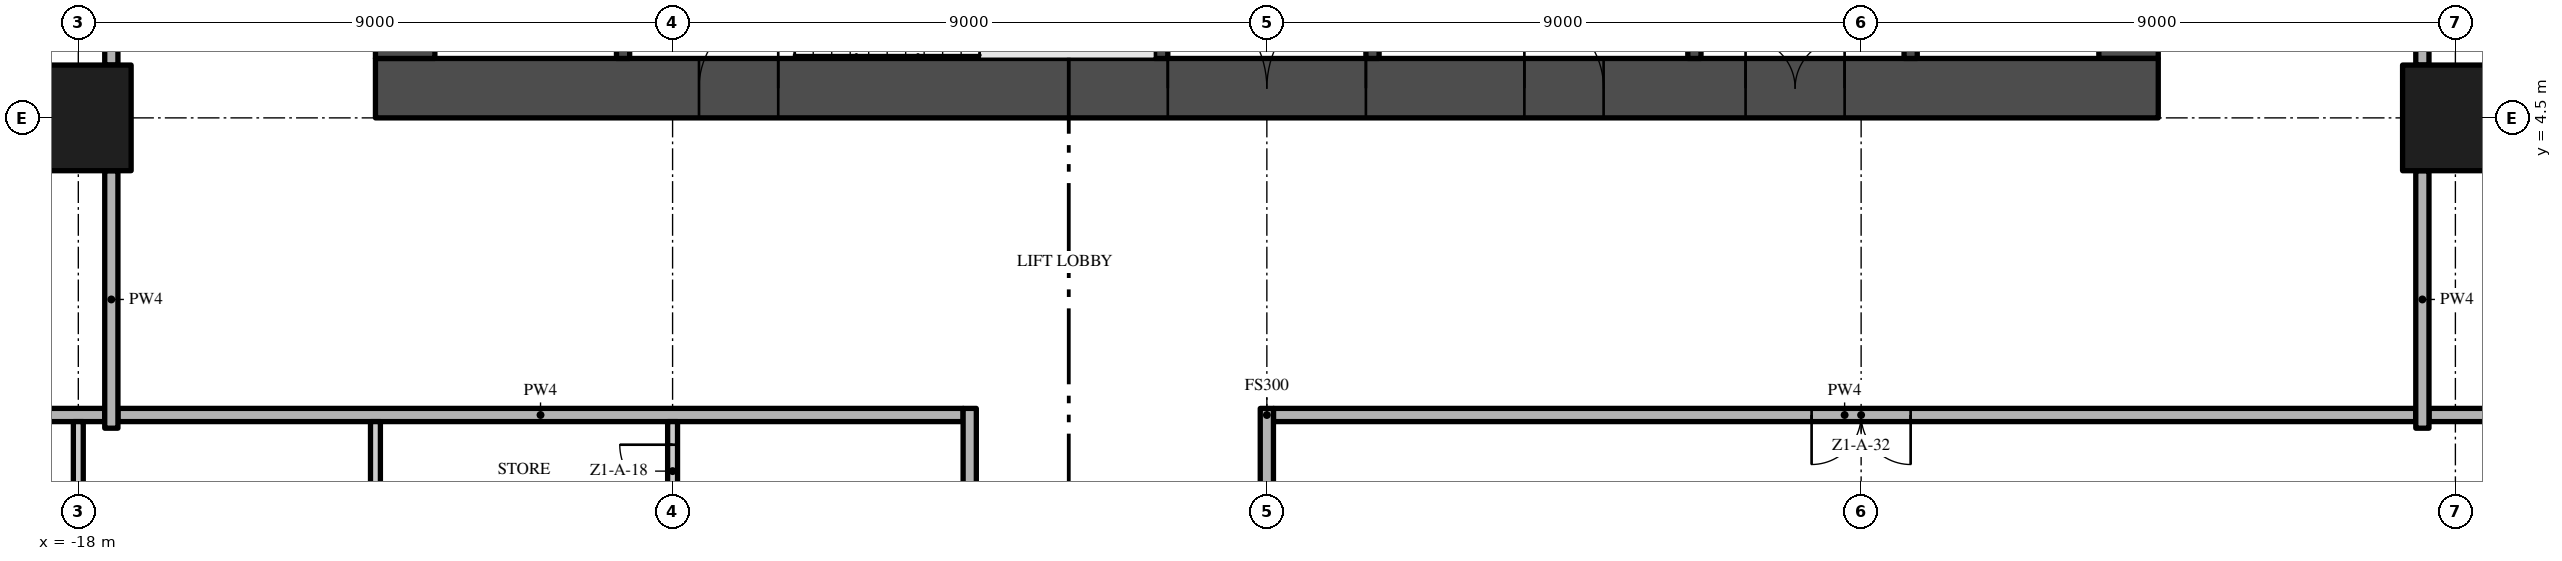
"""IFC4 building model, lengths in metres.
Left out: names, types, materials, properties, quantities, classifications, styles, units other than length and angle.
Written with IfcOpenShell. Run it as: python <this file> out.ifc"""

import sys

from ifc_helpers import new_model, si_unit, direction, frame, frame_2d, origin, origin_2d, place, context, subcontext, project, spatial, rectangle, extrude, element, fill, save


model = new_model("IFC4")
c1 = context("Model", 3, precision=1e-05, world=origin(), true_north=direction((0.0, 1.0)))
c2 = subcontext(c1, "Body", "Model", "MODEL_VIEW")
j1 = project(units=[si_unit("LENGTHUNIT", "METRE"), si_unit("PLANEANGLEUNIT", "RADIAN")], contexts=[c1])
p1 = place(None, origin())
s1 = spatial("IfcSite", under=j1, at=p1, CompositionType="ELEMENT")
p2 = place(p1, origin())
s2 = spatial("IfcBuilding", under=s1, at=p2, CompositionType="ELEMENT")
p3 = place(p2, frame((0.0, 0.0, 15.0)))
s3 = spatial("IfcBuildingStorey", under=s2, at=p3, CompositionType="ELEMENT", Elevation=15.0)
p4 = place(p3, frame((-13.5, 4.95, -0.3), z_axis=(0.0, 0.0, 1.0), x_axis=(1.0, 0.0, 0.0)))
e1 = element("IfcWall", 1, at=p4, inside=s3, PredefinedType="SHEAR", context=c2, shape_type="SweptSolid", body=[
    extrude(rectangle(XDim=27.0, YDim=0.9, at=frame_2d((13.5, 0.0))), origin(), (0.0, 0.0, 1.0), 3.8),
])
p5 = place(p4, frame((12.0, 0.0, 0.3)))
e2 = element("IfcOpeningElement", 2, at=p5, cuts=e1, PredefinedType="OPENING", context=c2, shape_type="SweptSolid", body=[
    extrude(rectangle(XDim=3.0, YDim=2.4, at=frame_2d((1.5, 1.2))), frame((0.0, 0.46, 0.0), z_axis=(0.0, -1.0, 0.0), x_axis=(1.0, 0.0, 0.0)), (0.0, 0.0, 1.0), 0.92),
])
p6 = place(p4, frame((4.9, 0.0, 0.3)))
e3 = element("IfcOpeningElement", 3, at=p6, cuts=e1, PredefinedType="OPENING", context=c2, shape_type="SweptSolid", body=[
    extrude(rectangle(XDim=1.2, YDim=2.2, at=frame_2d((0.6, 1.1))), frame((0.0, 0.46, 0.0), z_axis=(0.0, -1.0, 0.0), x_axis=(1.0, 0.0, 0.0)), (0.0, 0.0, 1.0), 0.92),
])
p7 = place(p4, frame((20.75, 0.0, 0.3)))
e4 = element("IfcOpeningElement", 4, at=p7, cuts=e1, PredefinedType="OPENING", context=c2, shape_type="SweptSolid", body=[
    extrude(rectangle(XDim=1.5, YDim=2.2, at=frame_2d((0.75, 1.1))), frame((0.0, 0.46, 0.0), z_axis=(0.0, -1.0, 0.0), x_axis=(1.0, 0.0, 0.0)), (0.0, 0.0, 1.0), 0.92),
])
p8 = place(p4, frame((17.4, 0.0, 0.3)))
e5 = element("IfcOpeningElement", 5, at=p8, cuts=e1, PredefinedType="OPENING", context=c2, shape_type="SweptSolid", body=[
    extrude(rectangle(XDim=1.2, YDim=2.2, at=frame_2d((0.6, 1.1))), frame((0.0, 0.46, 0.0), z_axis=(0.0, -1.0, 0.0), x_axis=(1.0, 0.0, 0.0)), (0.0, 0.0, 1.0), 0.92),
])
p9 = place(p3, frame((13.05, 5.4, -0.3), z_axis=(0.0, 0.0, 1.0), x_axis=(0.0, 1.0, 0.0)))
e6 = element("IfcWall", 6, at=p9, inside=s3, PredefinedType="SHEAR", context=c2, shape_type="SweptSolid", body=[
    extrude(rectangle(XDim=16.2, YDim=0.9, at=frame_2d((8.1, 0.0))), origin(), (0.0, 0.0, 1.0), 3.8),
])
p10 = place(p9, frame((6.0, 0.0, 0.3)))
e7 = element("IfcOpeningElement", 7, at=p10, cuts=e6, PredefinedType="OPENING", context=c2, shape_type="SweptSolid", body=[
    extrude(rectangle(XDim=1.2, YDim=2.2, at=frame_2d((0.6, 1.1))), frame((0.0, 0.46, 0.0), z_axis=(0.0, -1.0, 0.0), x_axis=(1.0, 0.0, 0.0)), (0.0, 0.0, 1.0), 0.92),
])
p11 = place(p3, frame((-13.05, 21.6, -0.3), z_axis=(0.0, 0.0, 1.0), x_axis=(0.0, -1.0, 0.0)))
e8 = element("IfcWall", 8, at=p11, inside=s3, PredefinedType="SHEAR", context=c2, shape_type="SweptSolid", body=[
    extrude(rectangle(XDim=16.2, YDim=0.9, at=frame_2d((8.1, 0.0))), origin(), (0.0, 0.0, 1.0), 3.8),
])
p12 = place(p11, frame((9.0, 0.0, 0.3)))
e9 = element("IfcOpeningElement", 9, at=p12, cuts=e8, PredefinedType="OPENING", context=c2, shape_type="SweptSolid", body=[
    extrude(rectangle(XDim=1.2, YDim=2.2, at=frame_2d((0.6, 1.1))), frame((0.0, 0.46, 0.0), z_axis=(0.0, -1.0, 0.0), x_axis=(1.0, 0.0, 0.0)), (0.0, 0.0, 1.0), 0.92),
])
for number, where, z_axis, x_axis in (
    (10, (-18.0, 4.5, 0.0), (0.0, 0.0, 1.0), (1.0, 0.0, 0.0)),
    (11, (18.0, 4.5, 0.0), (0.0, 0.0, 1.0), (1.0, 0.0, 0.0)),
):
    element("IfcColumn", number, at=place(p3, frame(where, z_axis=z_axis, x_axis=x_axis)), inside=s3, PredefinedType="COLUMN", context=c2, shape_type="SweptSolid", body=[
        extrude(rectangle(XDim=1.6, YDim=1.6, at=origin_2d()), origin(), (0.0, 0.0, 1.0), 3.5),
    ])
for number, where, z_axis, x_axis in (
    (12, (-9.75, 5.4, 0.0), (0.0, 0.0, 1.0), (0.0, 1.0, 0.0)),
    (13, (-1.6, 5.4, 0.0), (0.0, 0.0, 1.0), (0.0, 1.0, 0.0)),
):
    element("IfcWall", number, at=place(p3, frame(where, z_axis=z_axis, x_axis=x_axis)), inside=s3, PredefinedType="SHEAR", context=c2, shape_type="SweptSolid", body=[
        extrude(rectangle(XDim=2.55, YDim=0.2, at=frame_2d((1.275, 0.0))), origin(), (0.0, 0.0, 1.0), 3.5),
    ])
p13 = place(p3, frame((1.6, 11.5, 0.0), z_axis=(0.0, 0.0, 1.0), x_axis=(0.0, -1.0, 0.0)))
e14 = element("IfcWall", 14, at=p13, inside=s3, PredefinedType="SHEAR", context=c2, shape_type="SweptSolid", body=[
    extrude(rectangle(XDim=6.1, YDim=0.2, at=frame_2d((3.05, 0.0))), origin(), (0.0, 0.0, 1.0), 3.5),
])
p14 = place(p13, frame((2.2, 0.0, 0.0)))
e15 = element("IfcOpeningElement", 15, at=p14, cuts=e14, PredefinedType="OPENING", context=c2, shape_type="SweptSolid", body=[
    extrude(rectangle(XDim=0.9, YDim=2.1, at=frame_2d((0.45, 1.05))), frame((0.0, 0.11, 0.0), z_axis=(0.0, -1.0, 0.0), x_axis=(1.0, 0.0, 0.0)), (0.0, 0.0, 1.0), 0.22),
])
p15 = place(p3, frame((6.475, 5.4, 0.0), z_axis=(0.0, 0.0, 1.0), x_axis=(0.0, 1.0, 0.0)))
e16 = element("IfcWall", 16, at=p15, inside=s3, PredefinedType="SHEAR", context=c2, shape_type="SweptSolid", body=[
    extrude(rectangle(XDim=6.1, YDim=0.2, at=frame_2d((3.05, 0.0))), origin(), (0.0, 0.0, 1.0), 3.5),
])
p16 = place(p3, frame((9.75, 5.4, 0.0), z_axis=(0.0, 0.0, 1.0), x_axis=(0.0, 1.0, 0.0)))
e17 = element("IfcWall", 17, at=p16, inside=s3, PredefinedType="SHEAR", context=c2, shape_type="SweptSolid", body=[
    extrude(rectangle(XDim=2.2, YDim=0.2, at=frame_2d((1.1, 0.0))), origin(), (0.0, 0.0, 1.0), 3.5),
])
p17 = place(p16, frame((0.55, 0.0, 0.0)))
e18 = element("IfcOpeningElement", 18, at=p17, cuts=e17, PredefinedType="OPENING", context=c2, shape_type="SweptSolid", body=[
    extrude(rectangle(XDim=1.1, YDim=2.1, at=frame_2d((0.55, 1.05))), frame((0.0, 0.11, 0.0), z_axis=(0.0, -1.0, 0.0), x_axis=(1.0, 0.0, 0.0)), (0.0, 0.0, 1.0), 0.22),
])
p18 = place(p3, frame((-17.4, 0.0, 0.0), z_axis=(0.0, 0.0, 1.0), x_axis=(1.0, 0.0, 0.0)))
e19 = element("IfcWall", 19, at=p18, inside=s3, PredefinedType="PARTITIONING", context=c2, shape_type="SweptSolid", body=[
    extrude(rectangle(XDim=12.8, YDim=0.2, at=frame_2d((6.4, 0.0))), origin(), (0.0, 0.0, 1.0), 3.5),
])
p19 = place(p3, frame((17.4, 0.0, 0.0), z_axis=(0.0, 0.0, 1.0), x_axis=(-1.0, 0.0, 0.0)))
e20 = element("IfcWall", 20, at=p19, inside=s3, PredefinedType="PARTITIONING", context=c2, shape_type="SweptSolid", body=[
    extrude(rectangle(XDim=17.3, YDim=0.2, at=frame_2d((8.65, 0.0))), origin(), (0.0, 0.0, 1.0), 3.5),
])
p20 = place(p19, frame((7.65, 0.0, 0.0)))
e21 = element("IfcOpeningElement", 21, at=p20, cuts=e20, PredefinedType="OPENING", context=c2, shape_type="SweptSolid", body=[
    extrude(rectangle(XDim=1.5, YDim=2.4, at=frame_2d((0.75, 1.2))), frame((0.0, 0.11, 0.0), z_axis=(0.0, -1.0, 0.0), x_axis=(1.0, 0.0, 0.0)), (0.0, 0.0, 1.0), 0.22),
])
for number, where, z_axis, x_axis in (
    (22, (-26.7, 0.0, 0.0), (0.0, 0.0, 1.0), (1.0, 0.0, 0.0)),
    (23, (17.6, 0.0, 0.0), (0.0, 0.0, 1.0), (1.0, 0.0, 0.0)),
):
    element("IfcWall", number, at=place(p3, frame(where, z_axis=z_axis, x_axis=x_axis)), inside=s3, PredefinedType="PARTITIONING", context=c2, shape_type="SweptSolid", body=[
        extrude(rectangle(XDim=9.1, YDim=0.2, at=frame_2d((4.55, 0.0))), origin(), (0.0, 0.0, 1.0), 3.5),
    ])
p21 = place(p3, frame((-18.0, -3.7, 0.0), z_axis=(0.0, 0.0, 1.0), x_axis=(0.0, 1.0, 0.0)))
e24 = element("IfcWall", 24, at=p21, inside=s3, PredefinedType="PARTITIONING", context=c2, shape_type="SweptSolid", body=[
    extrude(rectangle(XDim=3.6, YDim=0.15, at=frame_2d((1.8, 0.0))), origin(), (0.0, 0.0, 1.0), 3.5),
])
p22 = place(p3, frame((-17.5, -0.2, 0.0), z_axis=(0.0, 0.0, 1.0), x_axis=(0.0, 1.0, 0.0)))
e25 = element("IfcWall", 25, at=p22, inside=s3, PredefinedType="PARTITIONING", context=c2, shape_type="SweptSolid", body=[
    extrude(rectangle(XDim=3.9, YDim=0.2, at=frame_2d((1.95, 0.0))), origin(), (0.0, 0.0, 1.0), 3.5),
])
p23 = place(p3, frame((-17.5, 5.3, 0.0), z_axis=(0.0, 0.0, 1.0), x_axis=(0.0, 1.0, 0.0)))
e26 = element("IfcWall", 26, at=p23, inside=s3, PredefinedType="PARTITIONING", context=c2, shape_type="SweptSolid", body=[
    extrude(rectangle(XDim=7.4, YDim=0.2, at=frame_2d((3.7, 0.0))), origin(), (0.0, 0.0, 1.0), 3.5),
])
p24 = place(p3, frame((-13.5, -9.975, 0.0), z_axis=(0.0, 0.0, 1.0), x_axis=(0.0, 1.0, 0.0)))
e27 = element("IfcWall", 27, at=p24, inside=s3, PredefinedType="PARTITIONING", context=c2, shape_type="SweptSolid", body=[
    extrude(rectangle(XDim=9.875, YDim=0.15, at=frame_2d((4.938, 0.0))), origin(), (0.0, 0.0, 1.0), 3.5),
])
p25 = place(p3, frame((-9.0, -3.7, 0.0), z_axis=(0.0, 0.0, 1.0), x_axis=(0.0, 1.0, 0.0)))
e28 = element("IfcWall", 28, at=p25, inside=s3, PredefinedType="PARTITIONING", context=c2, shape_type="SweptSolid", body=[
    extrude(rectangle(XDim=3.6, YDim=0.15, at=frame_2d((1.8, 0.0))), origin(), (0.0, 0.0, 1.0), 3.5),
])
p26 = place(p25, frame((2.45, 0.0, 0.0)))
e29 = element("IfcOpeningElement", 29, at=p26, cuts=e28, PredefinedType="OPENING", context=c2, shape_type="SweptSolid", body=[
    extrude(rectangle(XDim=0.8, YDim=2.0, at=frame_2d((0.4, 1.0))), frame((0.0, 0.085, 0.0), z_axis=(0.0, -1.0, 0.0), x_axis=(1.0, 0.0, 0.0)), (0.0, 0.0, 1.0), 0.17),
])
p27 = place(p3, frame((-4.5, -22.2, 0.0), z_axis=(0.0, 0.0, 1.0), x_axis=(0.0, 1.0, 0.0)))
e30 = element("IfcWall", 30, at=p27, inside=s3, PredefinedType="PARTITIONING", context=c2, shape_type="SweptSolid", body=[
    extrude(rectangle(XDim=22.3, YDim=0.2, at=frame_2d((11.15, 0.0))), origin(), (0.0, 0.0, 1.0), 3.5),
])
p28 = place(p27, frame((10.2, 0.0, 0.0)))
e31 = element("IfcOpeningElement", 31, at=p28, cuts=e30, PredefinedType="OPENING", context=c2, shape_type="SweptSolid", body=[
    extrude(rectangle(XDim=1.5, YDim=2.4, at=frame_2d((0.75, 1.2))), frame((0.0, 0.11, 0.0), z_axis=(0.0, -1.0, 0.0), x_axis=(1.0, 0.0, 0.0)), (0.0, 0.0, 1.0), 0.22),
])
p29 = place(p3, frame((0.0, -3.7, 0.0), z_axis=(0.0, 0.0, 1.0), x_axis=(0.0, 1.0, 0.0)))
e32 = element("IfcWall", 32, at=p29, inside=s3, PredefinedType="PARTITIONING", context=c2, shape_type="SweptSolid", body=[
    extrude(rectangle(XDim=3.8, YDim=0.2, at=frame_2d((1.9, 0.0))), origin(), (0.0, 0.0, 1.0), 3.5),
])
p30 = place(p3, frame((17.5, -0.2, 0.0), z_axis=(0.0, 0.0, 1.0), x_axis=(0.0, 1.0, 0.0)))
e33 = element("IfcWall", 33, at=p30, inside=s3, PredefinedType="PARTITIONING", context=c2, shape_type="SweptSolid", body=[
    extrude(rectangle(XDim=3.9, YDim=0.2, at=frame_2d((1.95, 0.0))), origin(), (0.0, 0.0, 1.0), 3.5),
])
p31 = place(p3, frame((17.5, 5.3, 0.0), z_axis=(0.0, 0.0, 1.0), x_axis=(0.0, 1.0, 0.0)))
e34 = element("IfcWall", 34, at=p31, inside=s3, PredefinedType="PARTITIONING", context=c2, shape_type="SweptSolid", body=[
    extrude(rectangle(XDim=7.4, YDim=0.2, at=frame_2d((3.7, 0.0))), origin(), (0.0, 0.0, 1.0), 3.5),
])
p32 = place(p5, frame((3.0, 0.0, 0.0), z_axis=(0.0, 0.0, 1.0), x_axis=(-1.0, 0.0, 0.0)))
e35 = element("IfcDoor", 35, at=p32, inside=s3, OperationType="DOUBLE_DOOR_SINGLE_SWING", PredefinedType="DOOR", context=c2, shape_type="SweptSolid", body=[
    extrude(rectangle(XDim=3.0, YDim=2.4, at=frame_2d((1.5, 1.2))), frame((0.0, 0.025, 0.0), z_axis=(0.0, -1.0, 0.0), x_axis=(1.0, 0.0, 0.0)), (0.0, 0.0, 1.0), 0.05),
])
fill(e2, e35)
p33 = place(p6, frame((1.2, 0.0, 0.0), z_axis=(0.0, 0.0, 1.0), x_axis=(-1.0, 0.0, 0.0)))
e36 = element("IfcDoor", 36, at=p33, inside=s3, OperationType="SINGLE_SWING_LEFT", PredefinedType="DOOR", context=c2, shape_type="SweptSolid", body=[
    extrude(rectangle(XDim=1.2, YDim=2.2, at=frame_2d((0.6, 1.1))), frame((0.0, 0.025, 0.0), z_axis=(0.0, -1.0, 0.0), x_axis=(1.0, 0.0, 0.0)), (0.0, 0.0, 1.0), 0.05),
])
fill(e3, e36)
p34 = place(p7, frame((1.5, 0.0, 0.0), z_axis=(0.0, 0.0, 1.0), x_axis=(-1.0, 0.0, 0.0)))
e37 = element("IfcDoor", 37, at=p34, inside=s3, OperationType="DOUBLE_DOOR_SINGLE_SWING", PredefinedType="DOOR", context=c2, shape_type="SweptSolid", body=[
    extrude(rectangle(XDim=1.5, YDim=2.2, at=frame_2d((0.75, 1.1))), frame((0.0, 0.025, 0.0), z_axis=(0.0, -1.0, 0.0), x_axis=(1.0, 0.0, 0.0)), (0.0, 0.0, 1.0), 0.05),
])
fill(e4, e37)
p35 = place(p8, frame((1.2, 0.0, 0.0), z_axis=(0.0, 0.0, 1.0), x_axis=(-1.0, 0.0, 0.0)))
e38 = element("IfcDoor", 38, at=p35, inside=s3, OperationType="SINGLE_SWING_RIGHT", PredefinedType="DOOR", context=c2, shape_type="SweptSolid", body=[
    extrude(rectangle(XDim=1.2, YDim=2.2, at=frame_2d((0.6, 1.1))), frame((0.0, 0.025, 0.0), z_axis=(0.0, -1.0, 0.0), x_axis=(1.0, 0.0, 0.0)), (0.0, 0.0, 1.0), 0.05),
])
fill(e5, e38)
p36 = place(p26, origin())
e39 = element("IfcDoor", 39, at=p36, inside=s3, OperationType="SINGLE_SWING_RIGHT", PredefinedType="DOOR", context=c2, shape_type="SweptSolid", body=[
    extrude(rectangle(XDim=0.8, YDim=2.0, at=frame_2d((0.4, 1.0))), frame((0.0, 0.025, 0.0), z_axis=(0.0, -1.0, 0.0), x_axis=(1.0, 0.0, 0.0)), (0.0, 0.0, 1.0), 0.05),
])
fill(e29, e39)
p37 = place(p20, origin())
e40 = element("IfcDoor", 40, at=p37, inside=s3, OperationType="DOUBLE_DOOR_SINGLE_SWING", PredefinedType="DOOR", context=c2, shape_type="SweptSolid", body=[
    extrude(rectangle(XDim=1.5, YDim=2.4, at=frame_2d((0.75, 1.2))), frame((0.0, 0.025, 0.0), z_axis=(0.0, -1.0, 0.0), x_axis=(1.0, 0.0, 0.0)), (0.0, 0.0, 1.0), 0.05),
])
fill(e21, e40)
save(model, sys.argv[1])
